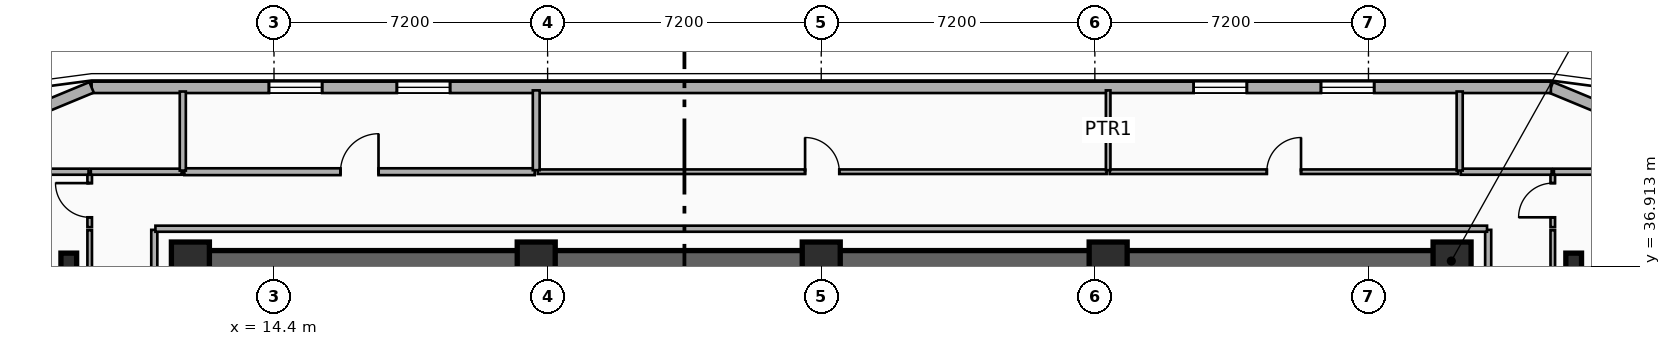
"""IFC4 building model, lengths in metres.
Left out: names, types, materials, properties, quantities, classifications, styles, units other than length and angle.
Written with IfcOpenShell. Run it as: python <this file> out.ifc"""

import sys

from ifc_helpers import new_model, si_unit, direction, frame, frame_2d, origin, origin_2d, place, context, subcontext, project, spatial, rectangle, i_section, extrude, element, fill, save


model = new_model("IFC4")
c1 = context("Model", 3, precision=1e-05, world=origin(), true_north=direction((0.0, 1.0)))
c2 = subcontext(c1, "Body", "Model", "MODEL_VIEW")
j1 = project(units=[si_unit("LENGTHUNIT", "METRE"), si_unit("PLANEANGLEUNIT", "RADIAN")], contexts=[c1])
p1 = place(None, origin())
s1 = spatial("IfcSite", under=j1, at=p1, CompositionType="ELEMENT")
p2 = place(p1, origin())
s2 = spatial("IfcBuilding", under=s1, at=p2, CompositionType="ELEMENT")
p3 = place(p2, frame((0.0, 0.0, 183.85)))
s3 = spatial("IfcBuildingStorey", under=s2, at=p3, CompositionType="ELEMENT", Elevation=183.85)
p4 = place(p3, frame((12.15, 37.05, 0.0), z_axis=(0.0, 0.0, 1.0), x_axis=(1.0, 0.0, 0.0)))
e1 = element("IfcWall", 1, at=p4, inside=s3, PredefinedType="SHEAR", context=c2, shape_type="SweptSolid", body=[
    extrude(rectangle(XDim=33.23, YDim=0.55, at=frame_2d((16.615, 0.0))), origin(), (0.0, 0.0, 1.0), 4.55),
])
for number, where, z_axis, x_axis in (
    (2, (12.2, 37.05, 0.0), (0.0, 0.0, 1.0), (1.0, 0.0, 0.0)),
    (3, (21.3, 37.05, 0.0), (0.0, 0.0, 1.0), (1.0, 0.0, 0.0)),
    (4, (28.8, 37.05, 0.0), (0.0, 0.0, 1.0), (1.0, 0.0, 0.0)),
    (5, (36.35, 37.05, 0.0), (0.0, 0.0, 1.0), (1.0, 0.0, 0.0)),
    (6, (45.4, 37.05, 0.0), (0.0, 0.0, 1.0), (1.0, 0.0, 0.0)),
):
    element("IfcColumn", number, at=place(p3, frame(where, z_axis=z_axis, x_axis=x_axis)), inside=s3, PredefinedType="COLUMN", context=c2, shape_type="SweptSolid", body=[
        extrude(rectangle(XDim=1.0, YDim=1.0, at=origin_2d()), origin(), (0.0, 0.0, 1.0), 4.55),
    ])
for number, where, z_axis, x_axis in (
    (7, (9.0, 37.05, 0.0), (0.0, 0.0, 1.0), (1.0, 0.0, 0.0)),
    (8, (48.6, 37.05, 0.0), (0.0, 0.0, 1.0), (1.0, 0.0, 0.0)),
):
    element("IfcColumn", number, at=place(p3, frame(where, z_axis=z_axis, x_axis=x_axis)), inside=s3, PredefinedType="COLUMN", context=c2, shape_type="SweptSolid", body=[
        extrude(i_section(OverallWidth=0.413, OverallDepth=0.415, WebThickness=0.03, FlangeThickness=0.047, FilletRadius=0.015, at=origin_2d()), origin(), (0.0, 0.0, 1.0), 4.55),
    ])
p5 = place(p3, frame((48.0, 41.62, 0.0), z_axis=(0.0, 0.0, 1.0), x_axis=(0.923870793506, -0.382704529509, 0.0)))
e9 = element("IfcWall", 9, at=p5, inside=s3, PredefinedType="SOLIDWALL", context=c2, shape_type="SweptSolid", body=[
    extrude(rectangle(XDim=3.077, YDim=0.3, at=frame_2d((1.538, 0.0))), origin(), (0.0, 0.0, 1.0), 4.23),
])
p6 = place(p3, frame((9.6, 41.62, 0.0), z_axis=(0.0, 0.0, 1.0), x_axis=(1.0, 0.0, 0.0)))
e10 = element("IfcWall", 10, at=p6, inside=s3, PredefinedType="SOLIDWALL", context=c2, shape_type="SweptSolid", body=[
    extrude(rectangle(XDim=38.4, YDim=0.3, at=frame_2d((19.2, 0.0))), origin(), (0.0, 0.0, 1.0), 4.23),
])
p7 = place(p6, frame((4.667, 0.0, 0.75)))
e11 = element("IfcOpeningElement", 11, at=p7, cuts=e10, PredefinedType="OPENING", context=c2, shape_type="SweptSolid", body=[
    extrude(rectangle(XDim=1.4, YDim=2.1, at=frame_2d((0.7, 1.05))), frame((0.0, 0.16, 0.0), z_axis=(0.0, -1.0, 0.0), x_axis=(1.0, 0.0, 0.0)), (0.0, 0.0, 1.0), 0.32),
])
p8 = place(p6, frame((8.033, 0.0, 0.75)))
e12 = element("IfcOpeningElement", 12, at=p8, cuts=e10, PredefinedType="OPENING", context=c2, shape_type="SweptSolid", body=[
    extrude(rectangle(XDim=1.4, YDim=2.1, at=frame_2d((0.7, 1.05))), frame((0.0, 0.16, 0.0), z_axis=(0.0, -1.0, 0.0), x_axis=(1.0, 0.0, 0.0)), (0.0, 0.0, 1.0), 0.32),
])
p9 = place(p6, frame((29.0, 0.0, 0.75)))
e13 = element("IfcOpeningElement", 13, at=p9, cuts=e10, PredefinedType="OPENING", context=c2, shape_type="SweptSolid", body=[
    extrude(rectangle(XDim=1.4, YDim=2.1, at=frame_2d((0.7, 1.05))), frame((0.0, 0.16, 0.0), z_axis=(0.0, -1.0, 0.0), x_axis=(1.0, 0.0, 0.0)), (0.0, 0.0, 1.0), 0.32),
])
p10 = place(p6, frame((32.35, 0.0, 0.75)))
e14 = element("IfcOpeningElement", 14, at=p10, cuts=e10, PredefinedType="OPENING", context=c2, shape_type="SweptSolid", body=[
    extrude(rectangle(XDim=1.4, YDim=2.1, at=frame_2d((0.7, 1.05))), frame((0.0, 0.16, 0.0), z_axis=(0.0, -1.0, 0.0), x_axis=(1.0, 0.0, 0.0)), (0.0, 0.0, 1.0), 0.32),
])
p11 = place(p3, frame((6.757, 40.443, 0.0), z_axis=(0.0, 0.0, 1.0), x_axis=(0.923882414032, 0.382676475685, 0.0)))
e15 = element("IfcWall", 15, at=p11, inside=s3, PredefinedType="SOLIDWALL", context=c2, shape_type="SweptSolid", body=[
    extrude(rectangle(XDim=3.077, YDim=0.3, at=frame_2d((1.539, 0.0))), origin(), (0.0, 0.0, 1.0), 4.23),
])
p12 = place(p3, frame((9.55, 27.64, 0.0), z_axis=(0.0, 0.0, 1.0), x_axis=(0.0, 1.0, 0.0)))
e16 = element("IfcWall", 16, at=p12, inside=s3, PredefinedType="PARTITIONING", context=c2, shape_type="SweptSolid", body=[
    extrude(rectangle(XDim=10.22, YDim=0.12, at=frame_2d((5.11, 0.0))), origin(), (0.0, 0.0, 1.0), 3.71),
])
p13 = place(p12, frame((4.66, 0.0, 0.0)))
e17 = element("IfcOpeningElement", 17, at=p13, cuts=e16, PredefinedType="OPENING", context=c2, shape_type="SweptSolid", body=[
    extrude(rectangle(XDim=0.9, YDim=2.1, at=frame_2d((0.45, 1.05))), frame((0.0, 0.07, 0.0), z_axis=(0.0, -1.0, 0.0), x_axis=(1.0, 0.0, 0.0)), (0.0, 0.0, 1.0), 0.14),
])
p14 = place(p3, frame((48.05, 27.64, 0.0), z_axis=(0.0, 0.0, 1.0), x_axis=(0.0, 1.0, 0.0)))
e18 = element("IfcWall", 18, at=p14, inside=s3, PredefinedType="PARTITIONING", context=c2, shape_type="SweptSolid", body=[
    extrude(rectangle(XDim=10.22, YDim=0.12, at=frame_2d((5.11, 0.0))), origin(), (0.0, 0.0, 1.0), 3.71),
])
p15 = place(p14, frame((4.66, 0.0, 0.0)))
e19 = element("IfcOpeningElement", 19, at=p15, cuts=e18, PredefinedType="OPENING", context=c2, shape_type="SweptSolid", body=[
    extrude(rectangle(XDim=0.9, YDim=2.1, at=frame_2d((0.45, 1.05))), frame((0.0, 0.07, 0.0), z_axis=(0.0, -1.0, 0.0), x_axis=(1.0, 0.0, 0.0)), (0.0, 0.0, 1.0), 0.14),
])
p16 = place(p3, frame((9.55, 37.94, 0.0), z_axis=(0.0, 0.0, 1.0), x_axis=(0.0, 1.0, 0.0)))
e20 = element("IfcWall", 20, at=p16, inside=s3, PredefinedType="PARTITIONING", context=c2, shape_type="SweptSolid", body=[
    extrude(rectangle(XDim=1.42, YDim=0.12, at=frame_2d((0.71, 0.0))), origin(), (0.0, 0.0, 1.0), 4.23),
])
p17 = place(p16, frame((0.26, 0.0, 0.0)))
e21 = element("IfcOpeningElement", 21, at=p17, cuts=e20, PredefinedType="OPENING", context=c2, shape_type="SweptSolid", body=[
    extrude(rectangle(XDim=0.9, YDim=2.1, at=frame_2d((0.45, 1.05))), frame((0.0, 0.07, 0.0), z_axis=(0.0, -1.0, 0.0), x_axis=(1.0, 0.0, 0.0)), (0.0, 0.0, 1.0), 0.14),
])
p18 = place(p3, frame((48.05, 37.94, 0.0), z_axis=(0.0, 0.0, 1.0), x_axis=(0.0, 1.0, 0.0)))
e22 = element("IfcWall", 22, at=p18, inside=s3, PredefinedType="PARTITIONING", context=c2, shape_type="SweptSolid", body=[
    extrude(rectangle(XDim=1.42, YDim=0.12, at=frame_2d((0.71, 0.0))), origin(), (0.0, 0.0, 1.0), 4.23),
])
p19 = place(p18, frame((0.26, 0.0, 0.0)))
e23 = element("IfcOpeningElement", 23, at=p19, cuts=e22, PredefinedType="OPENING", context=c2, shape_type="SweptSolid", body=[
    extrude(rectangle(XDim=0.9, YDim=2.1, at=frame_2d((0.45, 1.05))), frame((0.0, 0.07, 0.0), z_axis=(0.0, -1.0, 0.0), x_axis=(1.0, 0.0, 0.0)), (0.0, 0.0, 1.0), 0.14),
])
p20 = place(p3, frame((12.04, 39.4, 0.0), z_axis=(0.0, 0.0, 1.0), x_axis=(1.0, 0.0, 0.0)))
e24 = element("IfcWall", 24, at=p20, inside=s3, PredefinedType="PLUMBINGWALL", context=c2, shape_type="SweptSolid", body=[
    extrude(rectangle(XDim=9.22, YDim=0.18, at=frame_2d((4.61, 0.0))), origin(), (0.0, 0.0, 1.0), 4.23),
])
p21 = place(p20, frame((4.11, 0.0, 0.0)))
e25 = element("IfcOpeningElement", 25, at=p21, cuts=e24, PredefinedType="OPENING", context=c2, shape_type="SweptSolid", body=[
    extrude(rectangle(XDim=1.0, YDim=2.15, at=frame_2d((0.5, 1.075))), frame((0.0, 0.1, 0.0), z_axis=(0.0, -1.0, 0.0), x_axis=(1.0, 0.0, 0.0)), (0.0, 0.0, 1.0), 0.2),
])
p22 = place(p3, frame((21.34, 39.4, 0.0), z_axis=(0.0, 0.0, 1.0), x_axis=(1.0, 0.0, 0.0)))
e26 = element("IfcWall", 26, at=p22, inside=s3, PredefinedType="PARTITIONING", context=c2, shape_type="SweptSolid", body=[
    extrude(rectangle(XDim=14.97, YDim=0.12, at=frame_2d((7.485, 0.0))), origin(), (0.0, 0.0, 1.0), 4.23),
])
p23 = place(p22, frame((7.035, 0.0, 0.0)))
e27 = element("IfcOpeningElement", 27, at=p23, cuts=e26, PredefinedType="OPENING", context=c2, shape_type="SweptSolid", body=[
    extrude(rectangle(XDim=0.9, YDim=2.1, at=frame_2d((0.45, 1.05))), frame((0.0, 0.07, 0.0), z_axis=(0.0, -1.0, 0.0), x_axis=(1.0, 0.0, 0.0)), (0.0, 0.0, 1.0), 0.14),
])
p24 = place(p3, frame((36.39, 39.4, 0.0), z_axis=(0.0, 0.0, 1.0), x_axis=(1.0, 0.0, 0.0)))
e28 = element("IfcWall", 28, at=p24, inside=s3, PredefinedType="PARTITIONING", context=c2, shape_type="SweptSolid", body=[
    extrude(rectangle(XDim=9.17, YDim=0.12, at=frame_2d((4.585, 0.0))), origin(), (0.0, 0.0, 1.0), 4.23),
])
p25 = place(p24, frame((4.135, 0.0, 0.0)))
e29 = element("IfcOpeningElement", 29, at=p25, cuts=e28, PredefinedType="OPENING", context=c2, shape_type="SweptSolid", body=[
    extrude(rectangle(XDim=0.9, YDim=2.1, at=frame_2d((0.45, 1.05))), frame((0.0, 0.07, 0.0), z_axis=(0.0, -1.0, 0.0), x_axis=(1.0, 0.0, 0.0)), (0.0, 0.0, 1.0), 0.14),
])
p26 = place(p3, frame((21.3, 39.44, 0.0), z_axis=(0.0, 0.0, 1.0), x_axis=(0.0, 1.0, 0.0)))
e30 = element("IfcWall", 30, at=p26, inside=s3, PredefinedType="PLUMBINGWALL", context=c2, shape_type="SweptSolid", body=[
    extrude(rectangle(XDim=2.1, YDim=0.18, at=frame_2d((1.05, 0.0))), origin(), (0.0, 0.0, 1.0), 4.23),
])
p27 = place(p3, frame((36.35, 39.44, 0.0), z_axis=(0.0, 0.0, 1.0), x_axis=(0.0, 1.0, 0.0)))
e31 = element("IfcWall", 31, at=p27, inside=s3, PredefinedType="PARTITIONING", context=c2, shape_type="SweptSolid", body=[
    extrude(rectangle(XDim=2.1, YDim=0.12, at=frame_2d((1.05, 0.0))), origin(), (0.0, 0.0, 1.0), 4.23),
])
for number, where, z_axis, x_axis in (
    (32, (11.25, 27.63, 0.0), (0.0, 0.0, 1.0), (0.0, 1.0, 0.0)),
    (33, (46.35, 27.63, 0.0), (0.0, 0.0, 1.0), (0.0, 1.0, 0.0)),
):
    element("IfcWall", number, at=place(p3, frame(where, z_axis=z_axis, x_axis=x_axis)), inside=s3, PredefinedType="PARTITIONING", context=c2, shape_type="SweptSolid", body=[
        extrude(rectangle(XDim=10.24, YDim=0.16, at=frame_2d((5.12, 0.0))), origin(), (0.0, 0.0, 1.0), 3.71),
    ])
p28 = place(p3, frame((11.28, 37.9, 0.0), z_axis=(0.0, 0.0, 1.0), x_axis=(1.0, 0.0, 0.0)))
e34 = element("IfcWall", 34, at=p28, inside=s3, PredefinedType="PARTITIONING", context=c2, shape_type="SweptSolid", body=[
    extrude(rectangle(XDim=35.04, YDim=0.16, at=frame_2d((17.52, 0.0))), origin(), (0.0, 0.0, 1.0), 4.23),
])
p29 = place(p3, frame((9.58, 39.4, 0.0), z_axis=(0.0, 0.0, 1.0), x_axis=(1.0, 0.0, 0.0)))
e35 = element("IfcWall", 35, at=p29, inside=s3, PredefinedType="PARTITIONING", context=c2, shape_type="SweptSolid", body=[
    extrude(rectangle(XDim=2.39, YDim=0.16, at=frame_2d((1.195, 0.0))), origin(), (0.0, 0.0, 1.0), 4.23),
])
p30 = place(p3, frame((45.63, 39.4, 0.0), z_axis=(0.0, 0.0, 1.0), x_axis=(1.0, 0.0, 0.0)))
e36 = element("IfcWall", 36, at=p30, inside=s3, PredefinedType="PARTITIONING", context=c2, shape_type="SweptSolid", body=[
    extrude(rectangle(XDim=2.39, YDim=0.16, at=frame_2d((1.195, 0.0))), origin(), (0.0, 0.0, 1.0), 4.23),
])
p31 = place(p3, frame((5.69, 39.4, 0.0), z_axis=(0.0, 0.0, 1.0), x_axis=(1.0, 0.0, 0.0)))
e37 = element("IfcWall", 37, at=p31, inside=s3, PredefinedType="PARTITIONING", context=c2, shape_type="SweptSolid", body=[
    extrude(rectangle(XDim=3.83, YDim=0.16, at=frame_2d((1.915, 0.0))), origin(), (0.0, 0.0, 1.0), 4.23),
])
p32 = place(p3, frame((48.08, 39.4, 0.0), z_axis=(0.0, 0.0, 1.0), x_axis=(1.0, 0.0, 0.0)))
e38 = element("IfcWall", 38, at=p32, inside=s3, PredefinedType="PARTITIONING", context=c2, shape_type="SweptSolid", body=[
    extrude(rectangle(XDim=3.83, YDim=0.16, at=frame_2d((1.915, 0.0))), origin(), (0.0, 0.0, 1.0), 4.23),
])
for number, where, z_axis, x_axis in (
    (39, (12.0, 39.43, 0.0), (0.0, 0.0, 1.0), (0.0, 1.0, 0.0)),
    (40, (45.6, 39.43, 0.0), (0.0, 0.0, 1.0), (0.0, 1.0, 0.0)),
):
    element("IfcWall", number, at=place(p3, frame(where, z_axis=z_axis, x_axis=x_axis)), inside=s3, PredefinedType="PARTITIONING", context=c2, shape_type="SweptSolid", body=[
        extrude(rectangle(XDim=2.08, YDim=0.16, at=frame_2d((1.04, 0.0))), origin(), (0.0, 0.0, 1.0), 4.23),
    ])
p33 = place(p7, origin())
e41 = element("IfcWindow", 41, at=p33, inside=s3, PartitioningType="SINGLE_PANEL", PredefinedType="WINDOW", context=c2, shape_type="SweptSolid", body=[
    extrude(rectangle(XDim=1.4, YDim=2.1, at=frame_2d((0.7, 1.05))), frame((0.0, 0.03, 0.0), z_axis=(0.0, -1.0, 0.0), x_axis=(1.0, 0.0, 0.0)), (0.0, 0.0, 1.0), 0.06),
])
fill(e11, e41)
p34 = place(p8, origin())
e42 = element("IfcWindow", 42, at=p34, inside=s3, PartitioningType="SINGLE_PANEL", PredefinedType="WINDOW", context=c2, shape_type="SweptSolid", body=[
    extrude(rectangle(XDim=1.4, YDim=2.1, at=frame_2d((0.7, 1.05))), frame((0.0, 0.03, 0.0), z_axis=(0.0, -1.0, 0.0), x_axis=(1.0, 0.0, 0.0)), (0.0, 0.0, 1.0), 0.06),
])
fill(e12, e42)
p35 = place(p9, origin())
e43 = element("IfcWindow", 43, at=p35, inside=s3, PartitioningType="SINGLE_PANEL", PredefinedType="WINDOW", context=c2, shape_type="SweptSolid", body=[
    extrude(rectangle(XDim=1.4, YDim=2.1, at=frame_2d((0.7, 1.05))), frame((0.0, 0.03, 0.0), z_axis=(0.0, -1.0, 0.0), x_axis=(1.0, 0.0, 0.0)), (0.0, 0.0, 1.0), 0.06),
])
fill(e13, e43)
p36 = place(p10, origin())
e44 = element("IfcWindow", 44, at=p36, inside=s3, PartitioningType="SINGLE_PANEL", PredefinedType="WINDOW", context=c2, shape_type="SweptSolid", body=[
    extrude(rectangle(XDim=1.4, YDim=2.1, at=frame_2d((0.7, 1.05))), frame((0.0, 0.03, 0.0), z_axis=(0.0, -1.0, 0.0), x_axis=(1.0, 0.0, 0.0)), (0.0, 0.0, 1.0), 0.06),
])
fill(e14, e44)
p37 = place(p17, origin())
e45 = element("IfcDoor", 45, at=p37, inside=s3, OperationType="SINGLE_SWING_RIGHT", PredefinedType="DOOR", context=c2, shape_type="SweptSolid", body=[
    extrude(rectangle(XDim=0.9, YDim=2.1, at=frame_2d((0.45, 1.05))), frame((0.0, 0.025, 0.0), z_axis=(0.0, -1.0, 0.0), x_axis=(1.0, 0.0, 0.0)), (0.0, 0.0, 1.0), 0.05),
])
fill(e21, e45)
p38 = place(p19, origin())
e46 = element("IfcDoor", 46, at=p38, inside=s3, OperationType="SINGLE_SWING_LEFT", PredefinedType="DOOR", context=c2, shape_type="SweptSolid", body=[
    extrude(rectangle(XDim=0.9, YDim=2.1, at=frame_2d((0.45, 1.05))), frame((0.0, 0.025, 0.0), z_axis=(0.0, -1.0, 0.0), x_axis=(1.0, 0.0, 0.0)), (0.0, 0.0, 1.0), 0.05),
])
fill(e23, e46)
p39 = place(p21, origin())
e47 = element("IfcDoor", 47, at=p39, inside=s3, OperationType="SINGLE_SWING_RIGHT", PredefinedType="DOOR", context=c2, shape_type="SweptSolid", body=[
    extrude(rectangle(XDim=1.0, YDim=2.15, at=frame_2d((0.5, 1.075))), frame((0.0, 0.025, 0.0), z_axis=(0.0, -1.0, 0.0), x_axis=(1.0, 0.0, 0.0)), (0.0, 0.0, 1.0), 0.05),
])
fill(e25, e47)
p40 = place(p23, origin())
e48 = element("IfcDoor", 48, at=p40, inside=s3, OperationType="SINGLE_SWING_LEFT", PredefinedType="DOOR", context=c2, shape_type="SweptSolid", body=[
    extrude(rectangle(XDim=0.9, YDim=2.1, at=frame_2d((0.45, 1.05))), frame((0.0, 0.025, 0.0), z_axis=(0.0, -1.0, 0.0), x_axis=(1.0, 0.0, 0.0)), (0.0, 0.0, 1.0), 0.05),
])
fill(e27, e48)
p41 = place(p25, origin())
e49 = element("IfcDoor", 49, at=p41, inside=s3, OperationType="SINGLE_SWING_RIGHT", PredefinedType="DOOR", context=c2, shape_type="SweptSolid", body=[
    extrude(rectangle(XDim=0.9, YDim=2.1, at=frame_2d((0.45, 1.05))), frame((0.0, 0.025, 0.0), z_axis=(0.0, -1.0, 0.0), x_axis=(1.0, 0.0, 0.0)), (0.0, 0.0, 1.0), 0.05),
])
fill(e29, e49)
save(model, sys.argv[1])
